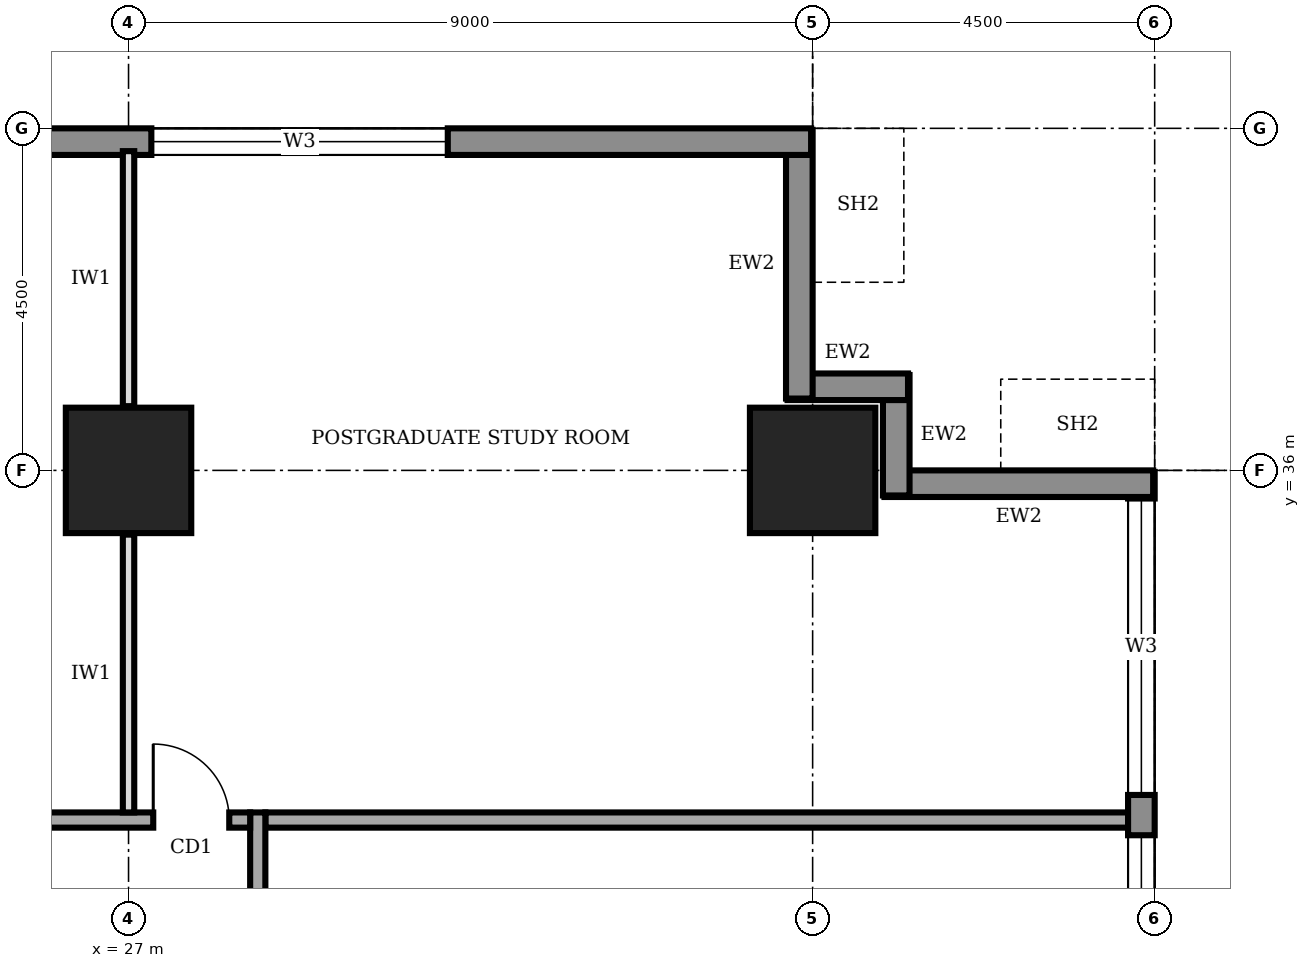
"""IFC4 building model, lengths in metres.
Left out: names, types, materials, properties, quantities, classifications, styles, units other than length and angle.
Written with IfcOpenShell. Run it as: python <this file> out.ifc"""

import sys

from ifc_helpers import new_model, si_unit, direction, frame, frame_2d, origin, origin_2d, place, context, subcontext, project, spatial, rectangle, extrude, element, fill, save


model = new_model("IFC4")
c1 = context("Model", 3, precision=1e-05, world=origin(), true_north=direction((0.0, 1.0)))
c2 = subcontext(c1, "Body", "Model", "MODEL_VIEW")
j1 = project(units=[si_unit("LENGTHUNIT", "METRE"), si_unit("PLANEANGLEUNIT", "RADIAN")], contexts=[c1])
p1 = place(None, origin())
s1 = spatial("IfcSite", under=j1, at=p1, CompositionType="ELEMENT")
p2 = place(p1, origin())
s2 = spatial("IfcBuilding", under=s1, at=p2, CompositionType="ELEMENT")
p3 = place(p2, frame((0.0, 0.0, 185.0)))
s3 = spatial("IfcBuildingStorey", under=s2, at=p3, CompositionType="ELEMENT", Elevation=185.0)
for number, where, z_axis, x_axis in (
    (1, (27.0, 36.0, 0.0), (0.0, 0.0, 1.0), (1.0, 0.0, 0.0)),
    (2, (36.0, 36.0, 0.0), (0.0, 0.0, 1.0), (1.0, 0.0, 0.0)),
):
    element("IfcColumn", number, at=place(p3, frame(where, z_axis=z_axis, x_axis=x_axis)), inside=s3, PredefinedType="COLUMN", context=c2, shape_type="SweptSolid", body=[
        extrude(rectangle(XDim=1.65, YDim=1.65, at=origin_2d()), origin(), (0.0, 0.0, 1.0), 4.0),
    ])
p4 = place(p3, frame((40.325, 4.52, 0.0), z_axis=(0.0, 0.0, 1.0), x_axis=(0.0, 1.0, 0.0)))
e3 = element("IfcWall", 3, at=p4, inside=s3, PredefinedType="STANDARD", context=c2, shape_type="SweptSolid", body=[
    extrude(rectangle(XDim=31.46, YDim=0.35, at=frame_2d((15.73, 0.0))), origin(), (0.0, 0.0, 1.0), 3.75),
])
p5 = place(p4, frame((4.78, 0.0, 0.95)))
e4 = element("IfcOpeningElement", 4, at=p5, cuts=e3, PredefinedType="OPENING", context=c2, shape_type="SweptSolid", body=[
    extrude(rectangle(XDim=3.9, YDim=1.8, at=frame_2d((1.95, 0.9))), frame((0.0, 0.185, 0.0), z_axis=(0.0, -1.0, 0.0), x_axis=(1.0, 0.0, 0.0)), (0.0, 0.0, 1.0), 0.37),
])
p6 = place(p4, frame((9.28, 0.0, 0.95)))
e5 = element("IfcOpeningElement", 5, at=p6, cuts=e3, PredefinedType="OPENING", context=c2, shape_type="SweptSolid", body=[
    extrude(rectangle(XDim=3.9, YDim=1.8, at=frame_2d((1.95, 0.9))), frame((0.0, 0.185, 0.0), z_axis=(0.0, -1.0, 0.0), x_axis=(1.0, 0.0, 0.0)), (0.0, 0.0, 1.0), 0.37),
])
p7 = place(p4, frame((13.78, 0.0, 0.95)))
e6 = element("IfcOpeningElement", 6, at=p7, cuts=e3, PredefinedType="OPENING", context=c2, shape_type="SweptSolid", body=[
    extrude(rectangle(XDim=3.9, YDim=1.8, at=frame_2d((1.95, 0.9))), frame((0.0, 0.185, 0.0), z_axis=(0.0, -1.0, 0.0), x_axis=(1.0, 0.0, 0.0)), (0.0, 0.0, 1.0), 0.37),
])
p8 = place(p4, frame((18.28, 0.0, 0.95)))
e7 = element("IfcOpeningElement", 7, at=p8, cuts=e3, PredefinedType="OPENING", context=c2, shape_type="SweptSolid", body=[
    extrude(rectangle(XDim=3.9, YDim=1.8, at=frame_2d((1.95, 0.9))), frame((0.0, 0.185, 0.0), z_axis=(0.0, -1.0, 0.0), x_axis=(1.0, 0.0, 0.0)), (0.0, 0.0, 1.0), 0.37),
])
p9 = place(p4, frame((22.78, 0.0, 0.95)))
e8 = element("IfcOpeningElement", 8, at=p9, cuts=e3, PredefinedType="OPENING", context=c2, shape_type="SweptSolid", body=[
    extrude(rectangle(XDim=3.9, YDim=1.8, at=frame_2d((1.95, 0.9))), frame((0.0, 0.185, 0.0), z_axis=(0.0, -1.0, 0.0), x_axis=(1.0, 0.0, 0.0)), (0.0, 0.0, 1.0), 0.37),
])
p10 = place(p4, frame((27.21, 0.0, 0.95)))
e9 = element("IfcOpeningElement", 9, at=p10, cuts=e3, PredefinedType="OPENING", context=c2, shape_type="SweptSolid", body=[
    extrude(rectangle(XDim=3.9, YDim=1.8, at=frame_2d((1.95, 0.9))), frame((0.0, 0.185, 0.0), z_axis=(0.0, -1.0, 0.0), x_axis=(1.0, 0.0, 0.0)), (0.0, 0.0, 1.0), 0.37),
])
p11 = place(p3, frame((40.48, 35.825, 0.0), z_axis=(0.0, 0.0, 1.0), x_axis=(-1.0, 0.0, 0.0)))
e10 = element("IfcWall", 10, at=p11, inside=s3, PredefinedType="STANDARD", context=c2, shape_type="SweptSolid", body=[
    extrude(rectangle(XDim=3.535, YDim=0.35, at=frame_2d((1.768, 0.0))), origin(), (0.0, 0.0, 1.0), 2.85),
])
for number, where, z_axis, x_axis in (
    (11, (37.1, 35.67, 0.0), (0.0, 0.0, 1.0), (0.0, 1.0, 0.0)),
    (12, (37.255, 37.1, 0.0), (0.0, 0.0, 1.0), (-1.0, 0.0, 0.0)),
):
    element("IfcWall", number, at=place(p3, frame(where, z_axis=z_axis, x_axis=x_axis)), inside=s3, PredefinedType="STANDARD", context=c2, shape_type="SweptSolid", body=[
        extrude(rectangle(XDim=1.585, YDim=0.35, at=frame_2d((0.792, 0.0))), origin(), (0.0, 0.0, 1.0), 3.75),
    ])
p12 = place(p3, frame((35.825, 36.945, 0.0), z_axis=(0.0, 0.0, 1.0), x_axis=(0.0, 1.0, 0.0)))
e13 = element("IfcWall", 13, at=p12, inside=s3, PredefinedType="STANDARD", context=c2, shape_type="SweptSolid", body=[
    extrude(rectangle(XDim=3.535, YDim=0.35, at=frame_2d((1.768, 0.0))), origin(), (0.0, 0.0, 1.0), 2.85),
])
p13 = place(p3, frame((35.98, 40.325, 0.0), z_axis=(0.0, 0.0, 1.0), x_axis=(-1.0, 0.0, 0.0)))
e14 = element("IfcWall", 14, at=p13, inside=s3, PredefinedType="STANDARD", context=c2, shape_type="SweptSolid", body=[
    extrude(rectangle(XDim=31.46, YDim=0.35, at=frame_2d((15.73, 0.0))), origin(), (0.0, 0.0, 1.0), 3.75),
])
p14 = place(p13, frame((27.21, 0.0, 0.95)))
e15 = element("IfcOpeningElement", 15, at=p14, cuts=e14, PredefinedType="OPENING", context=c2, shape_type="SweptSolid", body=[
    extrude(rectangle(XDim=3.9, YDim=1.8, at=frame_2d((1.95, 0.9))), frame((0.0, 0.185, 0.0), z_axis=(0.0, -1.0, 0.0), x_axis=(1.0, 0.0, 0.0)), (0.0, 0.0, 1.0), 0.37),
])
p15 = place(p13, frame((22.78, 0.0, 0.95)))
e16 = element("IfcOpeningElement", 16, at=p15, cuts=e14, PredefinedType="OPENING", context=c2, shape_type="SweptSolid", body=[
    extrude(rectangle(XDim=3.9, YDim=1.8, at=frame_2d((1.95, 0.9))), frame((0.0, 0.185, 0.0), z_axis=(0.0, -1.0, 0.0), x_axis=(1.0, 0.0, 0.0)), (0.0, 0.0, 1.0), 0.37),
])
p16 = place(p13, frame((4.78, 0.0, 0.95)))
e17 = element("IfcOpeningElement", 17, at=p16, cuts=e14, PredefinedType="OPENING", context=c2, shape_type="SweptSolid", body=[
    extrude(rectangle(XDim=3.9, YDim=1.8, at=frame_2d((1.95, 0.9))), frame((0.0, 0.185, 0.0), z_axis=(0.0, -1.0, 0.0), x_axis=(1.0, 0.0, 0.0)), (0.0, 0.0, 1.0), 0.37),
])
p17 = place(p3, frame((28.7, 9.2, 0.0), z_axis=(0.0, 0.0, 1.0), x_axis=(0.0, 1.0, 0.0)))
e18 = element("IfcWall", 18, at=p17, inside=s3, PredefinedType="SOLIDWALL", context=c2, shape_type="SweptSolid", body=[
    extrude(rectangle(XDim=22.3, YDim=0.2, at=frame_2d((11.15, 0.0))), origin(), (0.0, 0.0, 1.0), 3.75),
])
p18 = place(p17, frame((1.55, 0.0, 0.0)))
e19 = element("IfcOpeningElement", 19, at=p18, cuts=e18, PredefinedType="OPENING", context=c2, shape_type="SweptSolid", body=[
    extrude(rectangle(XDim=1.0, YDim=2.1, at=frame_2d((0.5, 1.05))), frame((0.0, 0.11, 0.0), z_axis=(0.0, -1.0, 0.0), x_axis=(1.0, 0.0, 0.0)), (0.0, 0.0, 1.0), 0.22),
])
p19 = place(p17, frame((6.05, 0.0, 0.0)))
e20 = element("IfcOpeningElement", 20, at=p19, cuts=e18, PredefinedType="OPENING", context=c2, shape_type="SweptSolid", body=[
    extrude(rectangle(XDim=1.0, YDim=2.1, at=frame_2d((0.5, 1.05))), frame((0.0, 0.11, 0.0), z_axis=(0.0, -1.0, 0.0), x_axis=(1.0, 0.0, 0.0)), (0.0, 0.0, 1.0), 0.22),
])
p20 = place(p17, frame((10.55, 0.0, 0.0)))
e21 = element("IfcOpeningElement", 21, at=p20, cuts=e18, PredefinedType="OPENING", context=c2, shape_type="SweptSolid", body=[
    extrude(rectangle(XDim=1.0, YDim=2.1, at=frame_2d((0.5, 1.05))), frame((0.0, 0.11, 0.0), z_axis=(0.0, -1.0, 0.0), x_axis=(1.0, 0.0, 0.0)), (0.0, 0.0, 1.0), 0.22),
])
p21 = place(p17, frame((15.05, 0.0, 0.0)))
e22 = element("IfcOpeningElement", 22, at=p21, cuts=e18, PredefinedType="OPENING", context=c2, shape_type="SweptSolid", body=[
    extrude(rectangle(XDim=1.0, YDim=2.1, at=frame_2d((0.5, 1.05))), frame((0.0, 0.11, 0.0), z_axis=(0.0, -1.0, 0.0), x_axis=(1.0, 0.0, 0.0)), (0.0, 0.0, 1.0), 0.22),
])
p22 = place(p17, frame((19.55, 0.0, 0.0)))
e23 = element("IfcOpeningElement", 23, at=p22, cuts=e18, PredefinedType="OPENING", context=c2, shape_type="SweptSolid", body=[
    extrude(rectangle(XDim=1.0, YDim=2.1, at=frame_2d((0.5, 1.05))), frame((0.0, 0.11, 0.0), z_axis=(0.0, -1.0, 0.0), x_axis=(1.0, 0.0, 0.0)), (0.0, 0.0, 1.0), 0.22),
])
p23 = place(p3, frame((28.6, 31.4, 0.0), z_axis=(0.0, 0.0, 1.0), x_axis=(-1.0, 0.0, 0.0)))
e24 = element("IfcWall", 24, at=p23, inside=s3, PredefinedType="SOLIDWALL", context=c2, shape_type="SweptSolid", body=[
    extrude(rectangle(XDim=16.9, YDim=0.2, at=frame_2d((8.45, 0.0))), origin(), (0.0, 0.0, 1.0), 3.75),
])
p24 = place(p23, frame((15.425, 0.0, 0.0)))
e25 = element("IfcOpeningElement", 25, at=p24, cuts=e24, PredefinedType="OPENING", context=c2, shape_type="SweptSolid", body=[
    extrude(rectangle(XDim=1.0, YDim=2.1, at=frame_2d((0.5, 1.05))), frame((0.0, 0.11, 0.0), z_axis=(0.0, -1.0, 0.0), x_axis=(1.0, 0.0, 0.0)), (0.0, 0.0, 1.0), 0.22),
])
p25 = place(p23, frame((12.35, 0.0, 0.0)))
e26 = element("IfcOpeningElement", 26, at=p25, cuts=e24, PredefinedType="OPENING", context=c2, shape_type="SweptSolid", body=[
    extrude(rectangle(XDim=1.0, YDim=2.1, at=frame_2d((0.5, 1.05))), frame((0.0, 0.11, 0.0), z_axis=(0.0, -1.0, 0.0), x_axis=(1.0, 0.0, 0.0)), (0.0, 0.0, 1.0), 0.22),
])
p26 = place(p23, frame((5.6, 0.0, 0.0)))
e27 = element("IfcOpeningElement", 27, at=p26, cuts=e24, PredefinedType="OPENING", context=c2, shape_type="SweptSolid", body=[
    extrude(rectangle(XDim=1.0, YDim=2.1, at=frame_2d((0.5, 1.05))), frame((0.0, 0.11, 0.0), z_axis=(0.0, -1.0, 0.0), x_axis=(1.0, 0.0, 0.0)), (0.0, 0.0, 1.0), 0.22),
])
p27 = place(p23, frame((0.275, 0.0, 0.0)))
e28 = element("IfcOpeningElement", 28, at=p27, cuts=e24, PredefinedType="OPENING", context=c2, shape_type="SweptSolid", body=[
    extrude(rectangle(XDim=1.0, YDim=2.1, at=frame_2d((0.5, 1.05))), frame((0.0, 0.11, 0.0), z_axis=(0.0, -1.0, 0.0), x_axis=(1.0, 0.0, 0.0)), (0.0, 0.0, 1.0), 0.22),
])
p28 = place(p3, frame((28.8, 31.4, 0.0), z_axis=(0.0, 0.0, 1.0), x_axis=(1.0, 0.0, 0.0)))
e29 = element("IfcWall", 29, at=p28, inside=s3, PredefinedType="SOLIDWALL", context=c2, shape_type="SweptSolid", body=[
    extrude(rectangle(XDim=11.4, YDim=0.2, at=frame_2d((5.7, 0.0))), origin(), (0.0, 0.0, 1.0), 3.75),
])
p29 = place(p3, frame((27.0, 31.5, 0.0), z_axis=(0.0, 0.0, 1.0), x_axis=(0.0, 1.0, 0.0)))
e30 = element("IfcWall", 30, at=p29, inside=s3, PredefinedType="PARTITIONING", context=c2, shape_type="SweptSolid", body=[
    extrude(rectangle(XDim=3.655, YDim=0.15, at=frame_2d((1.828, 0.0))), origin(), (0.0, 0.0, 1.0), 2.85),
])
p30 = place(p3, frame((27.0, 36.845, 0.0), z_axis=(0.0, 0.0, 1.0), x_axis=(0.0, 1.0, 0.0)))
e31 = element("IfcWall", 31, at=p30, inside=s3, PredefinedType="PARTITIONING", context=c2, shape_type="SweptSolid", body=[
    extrude(rectangle(XDim=3.355, YDim=0.15, at=frame_2d((1.677, 0.0))), origin(), (0.0, 0.0, 1.0), 2.85),
])
p31 = place(p9, origin())
e32 = element("IfcWindow", 32, at=p31, inside=s3, PartitioningType="SINGLE_PANEL", PredefinedType="WINDOW", context=c2, shape_type="SweptSolid", body=[
    extrude(rectangle(XDim=3.9, YDim=1.8, at=frame_2d((1.95, 0.9))), frame((0.0, 0.03, 0.0), z_axis=(0.0, -1.0, 0.0), x_axis=(1.0, 0.0, 0.0)), (0.0, 0.0, 1.0), 0.06),
])
fill(e8, e32)
p32 = place(p10, origin())
e33 = element("IfcWindow", 33, at=p32, inside=s3, PartitioningType="SINGLE_PANEL", PredefinedType="WINDOW", context=c2, shape_type="SweptSolid", body=[
    extrude(rectangle(XDim=3.9, YDim=1.8, at=frame_2d((1.95, 0.9))), frame((0.0, 0.03, 0.0), z_axis=(0.0, -1.0, 0.0), x_axis=(1.0, 0.0, 0.0)), (0.0, 0.0, 1.0), 0.06),
])
fill(e9, e33)
p33 = place(p16, origin())
e34 = element("IfcWindow", 34, at=p33, inside=s3, PartitioningType="SINGLE_PANEL", PredefinedType="WINDOW", context=c2, shape_type="SweptSolid", body=[
    extrude(rectangle(XDim=3.9, YDim=1.8, at=frame_2d((1.95, 0.9))), frame((0.0, 0.03, 0.0), z_axis=(0.0, -1.0, 0.0), x_axis=(1.0, 0.0, 0.0)), (0.0, 0.0, 1.0), 0.06),
])
fill(e17, e34)
p34 = place(p27, frame((1.0, 0.0, 0.0), z_axis=(0.0, 0.0, 1.0), x_axis=(-1.0, 0.0, 0.0)))
e35 = element("IfcDoor", 35, at=p34, inside=s3, OperationType="SINGLE_SWING_LEFT", PredefinedType="DOOR", context=c2, shape_type="SweptSolid", body=[
    extrude(rectangle(XDim=1.0, YDim=2.1, at=frame_2d((0.5, 1.05))), frame((0.0, 0.025, 0.0), z_axis=(0.0, -1.0, 0.0), x_axis=(1.0, 0.0, 0.0)), (0.0, 0.0, 1.0), 0.05),
])
fill(e28, e35)
save(model, sys.argv[1])
